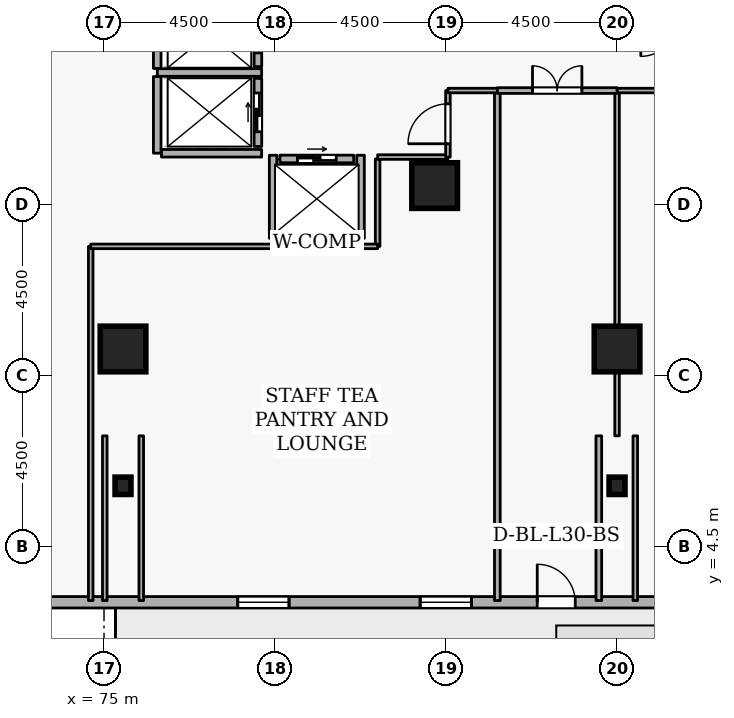
"""IFC4 building model, lengths in metres.
Left out: names, types, materials, properties, quantities, classifications, styles, units other than length and angle.
Written with IfcOpenShell. Run it as: python <this file> out.ifc"""

import sys

from ifc_helpers import new_model, si_unit, direction, frame, frame_2d, origin, origin_2d, place, context, subcontext, project, spatial, rectangle, i_section, extrude, element, fill, save


model = new_model("IFC4")
c1 = context("Model", 3, precision=1e-05, world=origin(), true_north=direction((0.0, 1.0)))
c2 = subcontext(c1, "Body", "Model", "MODEL_VIEW")
j1 = project(units=[si_unit("LENGTHUNIT", "METRE"), si_unit("PLANEANGLEUNIT", "RADIAN")], contexts=[c1])
p1 = place(None, origin())
s1 = spatial("IfcSite", under=j1, at=p1, CompositionType="ELEMENT")
p2 = place(p1, origin())
s2 = spatial("IfcBuilding", under=s1, at=p2, CompositionType="ELEMENT")
p3 = place(p2, frame((0.0, 0.0, 116.1)))
s3 = spatial("IfcBuildingStorey", under=s2, at=p3, CompositionType="ELEMENT", Elevation=116.1)
for number, where, z_axis, x_axis in (
    (1, (88.5, 9.7, 0.0), (0.0, 0.0, 1.0), (1.0, 0.0, 0.0)),
    (2, (75.5, 9.7, 0.0), (0.0, 0.0, 1.0), (1.0, 0.0, 0.0)),
    (3, (83.7, 14.0, 0.0), (0.0, 0.0, 1.0), (1.0, 0.0, 0.0)),
):
    element("IfcColumn", number, at=place(p3, frame(where, z_axis=z_axis, x_axis=x_axis)), inside=s3, PredefinedType="COLUMN", context=c2, shape_type="SweptSolid", body=[
        extrude(rectangle(XDim=1.2, YDim=1.2, at=origin_2d()), origin(), (0.0, 0.0, 1.0), 3.6),
    ])
for number, where, z_axis, x_axis in (
    (4, (88.5, 6.1, 0.0), (0.0, 0.0, 1.0), (1.0, 0.0, 0.0)),
    (5, (75.5, 6.1, 0.0), (0.0, 0.0, 1.0), (1.0, 0.0, 0.0)),
):
    element("IfcColumn", number, at=place(p3, frame(where, z_axis=z_axis, x_axis=x_axis)), inside=s3, PredefinedType="COLUMN", context=c2, shape_type="SweptSolid", body=[
        extrude(i_section(OverallWidth=0.418, OverallDepth=0.456, WebThickness=0.042, FlangeThickness=0.067, FilletRadius=0.015, at=origin_2d()), origin(), (0.0, 0.0, 1.0), 3.6),
    ])
p4 = place(p3, frame((67.119, 3.035, 0.0), z_axis=(0.0, 0.0, 1.0), x_axis=(1.0, 0.0, 0.0)))
e6 = element("IfcWall", 6, at=p4, inside=s3, PredefinedType="STANDARD", context=c2, shape_type="SweptSolid", body=[
    extrude(rectangle(XDim=36.763, YDim=0.3, at=frame_2d((18.381, 0.0))), origin(), (0.0, 0.0, 1.0), 2.22),
])
p5 = place(p4, frame((19.281, 0.0, 0.0)))
e7 = element("IfcOpeningElement", 7, at=p5, cuts=e6, PredefinedType="OPENING", context=c2, shape_type="SweptSolid", body=[
    extrude(rectangle(XDim=1.0, YDim=2.08, at=frame_2d((0.5, 1.04))), frame((0.0, 0.16, 0.0), z_axis=(0.0, -1.0, 0.0), x_axis=(1.0, 0.0, 0.0)), (0.0, 0.0, 1.0), 0.32),
])
p6 = place(p4, frame((1.8, 0.0, 0.72)))
e8 = element("IfcOpeningElement", 8, at=p6, cuts=e6, PredefinedType="OPENING", context=c2, shape_type="SweptSolid", body=[
    extrude(rectangle(XDim=1.35, YDim=1.05, at=frame_2d((0.675, 0.525))), frame((0.0, 0.16, 0.0), z_axis=(0.0, -1.0, 0.0), x_axis=(1.0, 0.0, 0.0)), (0.0, 0.0, 1.0), 0.32),
])
p7 = place(p4, frame((11.4, 0.0, 0.72)))
e9 = element("IfcOpeningElement", 9, at=p7, cuts=e6, PredefinedType="OPENING", context=c2, shape_type="SweptSolid", body=[
    extrude(rectangle(XDim=1.35, YDim=1.05, at=frame_2d((0.675, 0.525))), frame((0.0, 0.16, 0.0), z_axis=(0.0, -1.0, 0.0), x_axis=(1.0, 0.0, 0.0)), (0.0, 0.0, 1.0), 0.32),
])
p8 = place(p4, frame((16.2, 0.0, 0.72)))
e10 = element("IfcOpeningElement", 10, at=p8, cuts=e6, PredefinedType="OPENING", context=c2, shape_type="SweptSolid", body=[
    extrude(rectangle(XDim=1.35, YDim=1.05, at=frame_2d((0.675, 0.525))), frame((0.0, 0.16, 0.0), z_axis=(0.0, -1.0, 0.0), x_axis=(1.0, 0.0, 0.0)), (0.0, 0.0, 1.0), 0.32),
])
p9 = place(p4, frame((25.8, 0.0, 0.72)))
e11 = element("IfcOpeningElement", 11, at=p9, cuts=e6, PredefinedType="OPENING", context=c2, shape_type="SweptSolid", body=[
    extrude(rectangle(XDim=1.35, YDim=1.05, at=frame_2d((0.675, 0.525))), frame((0.0, 0.16, 0.0), z_axis=(0.0, -1.0, 0.0), x_axis=(1.0, 0.0, 0.0)), (0.0, 0.0, 1.0), 0.32),
])
p10 = place(p4, frame((30.6, 0.0, 0.72)))
e12 = element("IfcOpeningElement", 12, at=p10, cuts=e6, PredefinedType="OPENING", context=c2, shape_type="SweptSolid", body=[
    extrude(rectangle(XDim=1.35, YDim=1.05, at=frame_2d((0.675, 0.525))), frame((0.0, 0.16, 0.0), z_axis=(0.0, -1.0, 0.0), x_axis=(1.0, 0.0, 0.0)), (0.0, 0.0, 1.0), 0.32),
])
p11 = place(p3, frame((79.05, 17.13, 0.0), z_axis=(0.0, 0.0, 1.0), x_axis=(0.0, 1.0, 0.0)))
e13 = element("IfcWall", 13, at=p11, inside=s3, PredefinedType="STANDARD", context=c2, shape_type="SweptSolid", body=[
    extrude(rectangle(XDim=1.74, YDim=0.2, at=frame_2d((0.87, 0.0))), origin(), (0.0, 0.0, 1.0), 3.32),
])
p12 = place(p11, frame((0.36, 0.0, 0.0)))
e14 = element("IfcOpeningElement", 14, at=p12, cuts=e13, PredefinedType="OPENING", context=c2, shape_type="SweptSolid", body=[
    extrude(rectangle(XDim=1.02, YDim=2.06, at=frame_2d((0.51, 1.03))), frame((0.0, 0.11, 0.0), z_axis=(0.0, -1.0, 0.0), x_axis=(1.0, 0.0, 0.0)), (0.0, 0.0, 1.0), 0.22),
])
p13 = place(p3, frame((79.05, 15.03, 0.0), z_axis=(0.0, 0.0, 1.0), x_axis=(0.0, 1.0, 0.0)))
e15 = element("IfcWall", 15, at=p13, inside=s3, PredefinedType="STANDARD", context=c2, shape_type="SweptSolid", body=[
    extrude(rectangle(XDim=1.79, YDim=0.2, at=frame_2d((0.895, 0.0))), origin(), (0.0, 0.0, 1.0), 3.32),
])
p14 = place(p13, frame((0.385, 0.0, 0.0)))
e16 = element("IfcOpeningElement", 16, at=p14, cuts=e15, PredefinedType="OPENING", context=c2, shape_type="SweptSolid", body=[
    extrude(rectangle(XDim=1.02, YDim=2.06, at=frame_2d((0.51, 1.03))), frame((0.0, 0.11, 0.0), z_axis=(0.0, -1.0, 0.0), x_axis=(1.0, 0.0, 0.0)), (0.0, 0.0, 1.0), 0.22),
])
p15 = place(p3, frame((79.63, 14.7, 0.0), z_axis=(0.0, 0.0, 1.0), x_axis=(1.0, 0.0, 0.0)))
e17 = element("IfcWall", 17, at=p15, inside=s3, PredefinedType="STANDARD", context=c2, shape_type="SweptSolid", body=[
    extrude(rectangle(XDim=1.94, YDim=0.2, at=frame_2d((0.97, 0.0))), origin(), (0.0, 0.0, 1.0), 3.32),
])
p16 = place(p15, frame((0.46, 0.0, 0.0)))
e18 = element("IfcOpeningElement", 18, at=p16, cuts=e17, PredefinedType="OPENING", context=c2, shape_type="SweptSolid", body=[
    extrude(rectangle(XDim=1.02, YDim=2.06, at=frame_2d((0.51, 1.03))), frame((0.0, 0.11, 0.0), z_axis=(0.0, -1.0, 0.0), x_axis=(1.0, 0.0, 0.0)), (0.0, 0.0, 1.0), 0.22),
])
p17 = place(p3, frame((76.402, 16.975, 0.0), z_axis=(0.0, 0.0, 1.0), x_axis=(1.0, 0.0, 0.0)))
e19 = element("IfcWall", 19, at=p17, inside=s3, PredefinedType="STANDARD", context=c2, shape_type="SweptSolid", body=[
    extrude(rectangle(XDim=2.746, YDim=0.2, at=frame_2d((1.373, 0.0))), origin(), (0.0, 0.0, 1.0), 3.32),
])
p18 = place(p3, frame((76.4, 14.852, 0.0), z_axis=(0.0, 0.0, 1.0), x_axis=(0.0, 1.0, 0.0)))
e20 = element("IfcWall", 20, at=p18, inside=s3, PredefinedType="STANDARD", context=c2, shape_type="SweptSolid", body=[
    extrude(rectangle(XDim=2.016, YDim=0.2, at=frame_2d((1.008, 0.0))), origin(), (0.0, 0.0, 1.0), 3.32),
])
p19 = place(p3, frame((76.4, 17.082, 0.0), z_axis=(0.0, 0.0, 1.0), x_axis=(0.0, 1.0, 0.0)))
e21 = element("IfcWall", 21, at=p19, inside=s3, PredefinedType="STANDARD", context=c2, shape_type="SweptSolid", body=[
    extrude(rectangle(XDim=1.856, YDim=0.2, at=frame_2d((0.928, 0.0))), origin(), (0.0, 0.0, 1.0), 3.32),
])
p20 = place(p3, frame((76.512, 14.85, 0.0), z_axis=(0.0, 0.0, 1.0), x_axis=(1.0, 0.0, 0.0)))
e22 = element("IfcWall", 22, at=p20, inside=s3, PredefinedType="STANDARD", context=c2, shape_type="SweptSolid", body=[
    extrude(rectangle(XDim=2.636, YDim=0.2, at=frame_2d((1.318, 0.0))), origin(), (0.0, 0.0, 1.0), 3.32),
])
p21 = place(p3, frame((79.452, 12.5, 0.0), z_axis=(0.0, 0.0, 1.0), x_axis=(1.0, 0.0, 0.0)))
e23 = element("IfcWall", 23, at=p21, inside=s3, PredefinedType="STANDARD", context=c2, shape_type="SweptSolid", body=[
    extrude(rectangle(XDim=2.296, YDim=0.2, at=frame_2d((1.148, 0.0))), origin(), (0.0, 0.0, 1.0), 3.32),
])
for number, where, z_axis, x_axis in (
    (24, (81.75, 12.612, 0.0), (0.0, 0.0, 1.0), (0.0, 1.0, 0.0)),
    (25, (79.45, 12.612, 0.0), (0.0, 0.0, 1.0), (0.0, 1.0, 0.0)),
):
    element("IfcWall", number, at=place(p3, frame(where, z_axis=z_axis, x_axis=x_axis)), inside=s3, PredefinedType="STANDARD", context=c2, shape_type="SweptSolid", body=[
        extrude(rectangle(XDim=2.186, YDim=0.2, at=frame_2d((1.093, 0.0))), origin(), (0.0, 0.0, 1.0), 3.32),
    ])
p22 = place(p3, frame((88.98, 3.08, 0.0), z_axis=(0.0, 0.0, 1.0), x_axis=(0.0, 1.0, 0.0)))
e26 = element("IfcWall", 26, at=p22, inside=s3, PredefinedType="PARTITIONING", context=c2, shape_type="SweptSolid", body=[
    extrude(rectangle(XDim=4.334, YDim=0.12, at=frame_2d((2.167, 0.0))), origin(), (0.0, 0.0, 1.0), 1.685),
])
p23 = place(p3, frame((88.5, 7.414, 0.0), z_axis=(0.0, 0.0, 1.0), x_axis=(0.0, 1.0, 0.0)))
e27 = element("IfcWall", 27, at=p23, inside=s3, PredefinedType="PARTITIONING", context=c2, shape_type="SweptSolid", body=[
    extrude(rectangle(XDim=9.086, YDim=0.12, at=frame_2d((4.543, 0.0))), origin(), (0.0, 0.0, 1.0), 1.685),
])
p24 = place(p3, frame((88.5, 16.5, 0.0), z_axis=(0.0, 0.0, 1.0), x_axis=(1.0, 0.0, 0.0)))
e28 = element("IfcWall", 28, at=p24, inside=s3, PredefinedType="PARTITIONING", context=c2, shape_type="SweptSolid", body=[
    extrude(rectangle(XDim=4.45, YDim=0.12, at=frame_2d((2.225, 0.0))), origin(), (0.0, 0.0, 1.0), 3.32),
])
p25 = place(p24, frame((1.7, 0.0, 0.0)))
e29 = element("IfcOpeningElement", 29, at=p25, cuts=e28, PredefinedType="OPENING", context=c2, shape_type="SweptSolid", body=[
    extrude(rectangle(XDim=1.05, YDim=2.1, at=frame_2d((0.525, 1.05))), frame((0.0, 0.07, 0.0), z_axis=(0.0, -1.0, 0.0), x_axis=(1.0, 0.0, 0.0)), (0.0, 0.0, 1.0), 0.14),
])
p26 = place(p3, frame((88.02, 7.414, 0.0), z_axis=(0.0, 0.0, 1.0), x_axis=(0.0, -1.0, 0.0)))
e30 = element("IfcWall", 30, at=p26, inside=s3, PredefinedType="PARTITIONING", context=c2, shape_type="SweptSolid", body=[
    extrude(rectangle(XDim=4.334, YDim=0.15, at=frame_2d((2.167, 0.0))), origin(), (0.0, 0.0, 1.0), 1.685),
])
p27 = place(p3, frame((85.35, 3.08, 0.0), z_axis=(0.0, 0.0, 1.0), x_axis=(0.0, 1.0, 0.0)))
e31 = element("IfcWall", 31, at=p27, inside=s3, PredefinedType="PARTITIONING", context=c2, shape_type="SweptSolid", body=[
    extrude(rectangle(XDim=13.42, YDim=0.15, at=frame_2d((6.71, 0.0))), origin(), (0.0, 0.0, 1.0), 3.32),
])
p28 = place(p3, frame((85.35, 16.5, 0.0), z_axis=(0.0, 0.0, 1.0), x_axis=(1.0, 0.0, 0.0)))
e32 = element("IfcWall", 32, at=p28, inside=s3, PredefinedType="PARTITIONING", context=c2, shape_type="SweptSolid", body=[
    extrude(rectangle(XDim=3.15, YDim=0.15, at=frame_2d((1.575, 0.0))), origin(), (0.0, 0.0, 1.0), 3.32),
])
p29 = place(p28, frame((0.925, 0.0, 0.0)))
e33 = element("IfcOpeningElement", 33, at=p29, cuts=e32, PredefinedType="OPENING", context=c2, shape_type="SweptSolid", body=[
    extrude(rectangle(XDim=1.3, YDim=2.12, at=frame_2d((0.65, 1.06))), frame((0.0, 0.085, 0.0), z_axis=(0.0, -1.0, 0.0), x_axis=(1.0, 0.0, 0.0)), (0.0, 0.0, 1.0), 0.17),
])
p30 = place(p3, frame((82.2, 12.4, 0.0), z_axis=(0.0, 0.0, 1.0), x_axis=(0.0, 1.0, 0.0)))
e34 = element("IfcWall", 34, at=p30, inside=s3, PredefinedType="PARTITIONING", context=c2, shape_type="SweptSolid", body=[
    extrude(rectangle(XDim=2.3, YDim=0.12, at=frame_2d((1.15, 0.0))), origin(), (0.0, 0.0, 1.0), 3.32),
])
p31 = place(p3, frame((82.2, 14.75, 0.0), z_axis=(0.0, 0.0, 1.0), x_axis=(1.0, 0.0, 0.0)))
e35 = element("IfcWall", 35, at=p31, inside=s3, PredefinedType="PARTITIONING", context=c2, shape_type="SweptSolid", body=[
    extrude(rectangle(XDim=1.85, YDim=0.12, at=frame_2d((0.925, 0.0))), origin(), (0.0, 0.0, 1.0), 3.32),
])
p32 = place(p3, frame((84.05, 14.75, 0.0), z_axis=(0.0, 0.0, 1.0), x_axis=(0.0, 1.0, 0.0)))
e36 = element("IfcWall", 36, at=p32, inside=s3, PredefinedType="PARTITIONING", context=c2, shape_type="SweptSolid", body=[
    extrude(rectangle(XDim=1.75, YDim=0.12, at=frame_2d((0.875, 0.0))), origin(), (0.0, 0.0, 1.0), 3.32),
])
p33 = place(p32, frame((0.35, 0.0, 0.0)))
e37 = element("IfcOpeningElement", 37, at=p33, cuts=e36, PredefinedType="OPENING", context=c2, shape_type="SweptSolid", body=[
    extrude(rectangle(XDim=1.05, YDim=2.1, at=frame_2d((0.525, 1.05))), frame((0.0, 0.07, 0.0), z_axis=(0.0, -1.0, 0.0), x_axis=(1.0, 0.0, 0.0)), (0.0, 0.0, 1.0), 0.14),
])
p34 = place(p3, frame((84.05, 16.5, 0.0), z_axis=(0.0, 0.0, 1.0), x_axis=(1.0, 0.0, 0.0)))
e38 = element("IfcWall", 38, at=p34, inside=s3, PredefinedType="PARTITIONING", context=c2, shape_type="SweptSolid", body=[
    extrude(rectangle(XDim=1.3, YDim=0.12, at=frame_2d((0.65, 0.0))), origin(), (0.0, 0.0, 1.0), 3.32),
])
for number, where, z_axis, x_axis in (
    (39, (75.98, 3.08, 0.0), (0.0, 0.0, 1.0), (0.0, 1.0, 0.0)),
    (40, (75.02, 7.414, 0.0), (0.0, 0.0, 1.0), (0.0, -1.0, 0.0)),
):
    element("IfcWall", number, at=place(p3, frame(where, z_axis=z_axis, x_axis=x_axis)), inside=s3, PredefinedType="PARTITIONING", context=c2, shape_type="SweptSolid", body=[
        extrude(rectangle(XDim=4.334, YDim=0.12, at=frame_2d((2.167, 0.0))), origin(), (0.0, 0.0, 1.0), 1.685),
    ])
p35 = place(p3, frame((74.65, 3.08, 0.0), z_axis=(0.0, 0.0, 1.0), x_axis=(0.0, 1.0, 0.0)))
e41 = element("IfcWall", 41, at=p35, inside=s3, PredefinedType="PARTITIONING", context=c2, shape_type="SweptSolid", body=[
    extrude(rectangle(XDim=9.32, YDim=0.12, at=frame_2d((4.66, 0.0))), origin(), (0.0, 0.0, 1.0), 3.32),
])
p36 = place(p3, frame((74.65, 12.4, 0.0), z_axis=(0.0, 0.0, 1.0), x_axis=(1.0, 0.0, 0.0)))
e42 = element("IfcWall", 42, at=p36, inside=s3, PredefinedType="PARTITIONING", context=c2, shape_type="SweptSolid", body=[
    extrude(rectangle(XDim=4.802, YDim=0.12, at=frame_2d((2.401, 0.0))), origin(), (0.0, 0.0, 1.0), 3.32),
])
p37 = place(p3, frame((81.748, 12.4, 0.0), z_axis=(0.0, 0.0, 1.0), x_axis=(1.0, 0.0, 0.0)))
e43 = element("IfcWall", 43, at=p37, inside=s3, PredefinedType="PARTITIONING", context=c2, shape_type="SweptSolid", body=[
    extrude(rectangle(XDim=0.452, YDim=0.12, at=frame_2d((0.226, 0.0))), origin(), (0.0, 0.0, 1.0), 3.32),
])
p38 = place(p5, origin())
e44 = element("IfcDoor", 44, at=p38, inside=s3, OperationType="SINGLE_SWING_LEFT", PredefinedType="DOOR", context=c2, shape_type="SweptSolid", body=[
    extrude(rectangle(XDim=1.0, YDim=2.08, at=frame_2d((0.5, 1.04))), frame((0.0, 0.025, 0.0), z_axis=(0.0, -1.0, 0.0), x_axis=(1.0, 0.0, 0.0)), (0.0, 0.0, 1.0), 0.05),
])
fill(e7, e44)
p39 = place(p7, origin())
e45 = element("IfcWindow", 45, at=p39, inside=s3, PartitioningType="SINGLE_PANEL", PredefinedType="WINDOW", context=c2, shape_type="SweptSolid", body=[
    extrude(rectangle(XDim=1.35, YDim=1.05, at=frame_2d((0.675, 0.525))), frame((0.0, 0.03, 0.0), z_axis=(0.0, -1.0, 0.0), x_axis=(1.0, 0.0, 0.0)), (0.0, 0.0, 1.0), 0.06),
])
fill(e9, e45)
p40 = place(p8, origin())
e46 = element("IfcWindow", 46, at=p40, inside=s3, PartitioningType="SINGLE_PANEL", PredefinedType="WINDOW", context=c2, shape_type="SweptSolid", body=[
    extrude(rectangle(XDim=1.35, YDim=1.05, at=frame_2d((0.675, 0.525))), frame((0.0, 0.03, 0.0), z_axis=(0.0, -1.0, 0.0), x_axis=(1.0, 0.0, 0.0)), (0.0, 0.0, 1.0), 0.06),
])
fill(e10, e46)
p41 = place(p12, origin())
e47 = element("IfcDoor", 47, at=p41, inside=s3, OperationType="SLIDING_TO_LEFT", PredefinedType="DOOR", context=c2, shape_type="SweptSolid", body=[
    extrude(rectangle(XDim=1.02, YDim=2.06, at=frame_2d((0.51, 1.03))), frame((0.0, 0.025, 0.0), z_axis=(0.0, -1.0, 0.0), x_axis=(1.0, 0.0, 0.0)), (0.0, 0.0, 1.0), 0.05),
])
fill(e14, e47)
p42 = place(p14, origin())
e48 = element("IfcDoor", 48, at=p42, inside=s3, OperationType="SLIDING_TO_LEFT", PredefinedType="DOOR", context=c2, shape_type="SweptSolid", body=[
    extrude(rectangle(XDim=1.02, YDim=2.06, at=frame_2d((0.51, 1.03))), frame((0.0, 0.025, 0.0), z_axis=(0.0, -1.0, 0.0), x_axis=(1.0, 0.0, 0.0)), (0.0, 0.0, 1.0), 0.05),
])
fill(e16, e48)
p43 = place(p16, origin())
e49 = element("IfcDoor", 49, at=p43, inside=s3, OperationType="SLIDING_TO_LEFT", PredefinedType="DOOR", context=c2, shape_type="SweptSolid", body=[
    extrude(rectangle(XDim=1.02, YDim=2.06, at=frame_2d((0.51, 1.03))), frame((0.0, 0.025, 0.0), z_axis=(0.0, -1.0, 0.0), x_axis=(1.0, 0.0, 0.0)), (0.0, 0.0, 1.0), 0.05),
])
fill(e18, e49)
p44 = place(p29, origin())
e50 = element("IfcDoor", 50, at=p44, inside=s3, OperationType="DOUBLE_DOOR_SINGLE_SWING", PredefinedType="DOOR", context=c2, shape_type="SweptSolid", body=[
    extrude(rectangle(XDim=1.3, YDim=2.12, at=frame_2d((0.65, 1.06))), frame((0.0, 0.025, 0.0), z_axis=(0.0, -1.0, 0.0), x_axis=(1.0, 0.0, 0.0)), (0.0, 0.0, 1.0), 0.05),
])
fill(e33, e50)
p45 = place(p33, origin())
e51 = element("IfcDoor", 51, at=p45, inside=s3, OperationType="SINGLE_SWING_LEFT", PredefinedType="DOOR", context=c2, shape_type="SweptSolid", body=[
    extrude(rectangle(XDim=1.05, YDim=2.1, at=frame_2d((0.525, 1.05))), frame((0.0, 0.025, 0.0), z_axis=(0.0, -1.0, 0.0), x_axis=(1.0, 0.0, 0.0)), (0.0, 0.0, 1.0), 0.05),
])
fill(e37, e51)
save(model, sys.argv[1])
